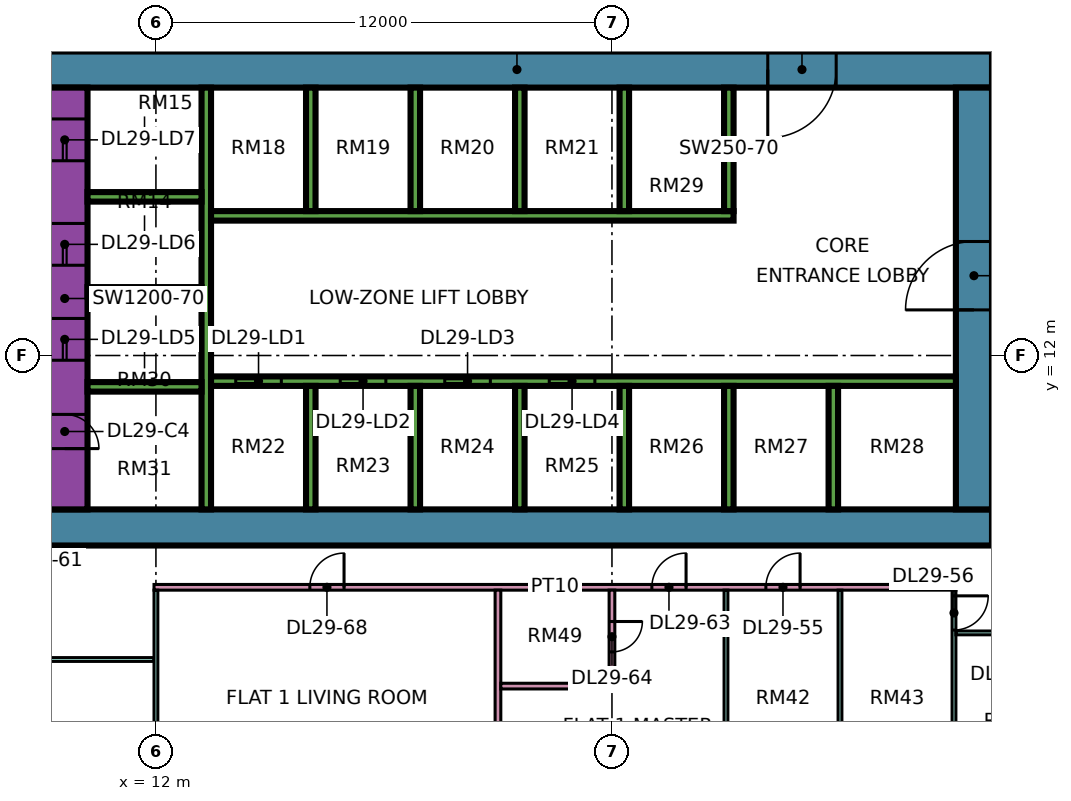
"""IFC4 building model, lengths in metres.
Left out: names, types, materials, properties, quantities, classifications, styles, units other than length and angle.
Written with IfcOpenShell. Run it as: python <this file> out.ifc"""

import sys

from ifc_helpers import new_model, si_unit, direction, frame, frame_2d, origin, place, context, subcontext, project, spatial, rectangle, extrude, element, fill, save


model = new_model("IFC4")
c1 = context("Model", 3, precision=1e-05, world=origin(), true_north=direction((0.0, 1.0)))
c2 = subcontext(c1, "Body", "Model", "MODEL_VIEW")
j1 = project(units=[si_unit("LENGTHUNIT", "METRE"), si_unit("PLANEANGLEUNIT", "RADIAN")], contexts=[c1])
p1 = place(None, origin())
s1 = spatial("IfcSite", under=j1, at=p1, CompositionType="ELEMENT")
p2 = place(p1, origin())
s2 = spatial("IfcBuilding", under=s1, at=p2, CompositionType="ELEMENT")
p3 = place(p2, frame((0.0, 0.0, 125.65)))
s3 = spatial("IfcBuildingStorey", under=s2, at=p3, CompositionType="ELEMENT", Elevation=125.65)
p4 = place(p3, frame((9.0, 7.475, 0.0), z_axis=(0.0, 0.0, 1.0), x_axis=(1.0, 0.0, 0.0)))
e1 = element("IfcWall", 1, at=p4, inside=s3, PredefinedType="SHEAR", context=c2, shape_type="SweptSolid", body=[
    extrude(rectangle(XDim=25.0, YDim=0.95, at=frame_2d((12.5, 0.0))), origin(), (0.0, 0.0, 1.0), 3.75),
])
p5 = place(p3, frame((9.0, 19.525, 0.0), z_axis=(0.0, 0.0, 1.0), x_axis=(1.0, 0.0, 0.0)))
e2 = element("IfcWall", 2, at=p5, inside=s3, PredefinedType="SHEAR", context=c2, shape_type="SweptSolid", body=[
    extrude(rectangle(XDim=25.0, YDim=0.95, at=frame_2d((12.5, 0.0))), origin(), (0.0, 0.0, 1.0), 3.75),
])
p6 = place(p5, frame((19.1, 0.0, 0.0)))
e3 = element("IfcOpeningElement", 3, at=p6, cuts=e2, PredefinedType="OPENING", context=c2, shape_type="SweptSolid", body=[
    extrude(rectangle(XDim=1.8, YDim=2.4, at=frame_2d((0.9, 1.2))), frame((0.0, 0.485, 0.0), z_axis=(0.0, -1.0, 0.0), x_axis=(1.0, 0.0, 0.0)), (0.0, 0.0, 1.0), 0.97),
])
p7 = place(p3, frame((9.6, 7.95, 0.0), z_axis=(0.0, 0.0, 1.0), x_axis=(0.0, 1.0, 0.0)))
e4 = element("IfcWall", 4, at=p7, inside=s3, PredefinedType="SHEAR", context=c2, shape_type="SweptSolid", body=[
    extrude(rectangle(XDim=11.1, YDim=1.2, at=frame_2d((5.55, 0.0))), origin(), (0.0, 0.0, 1.0), 3.75),
])
p8 = place(p7, frame((3.925, 0.0, 0.0)))
e5 = element("IfcOpeningElement", 5, at=p8, cuts=e4, PredefinedType="OPENING", context=c2, shape_type="SweptSolid", body=[
    extrude(rectangle(XDim=1.1, YDim=2.2, at=frame_2d((0.55, 1.1))), frame((0.0, 0.61, 0.0), z_axis=(0.0, -1.0, 0.0), x_axis=(1.0, 0.0, 0.0)), (0.0, 0.0, 1.0), 1.22),
])
p9 = place(p7, frame((6.425, 0.0, 0.0)))
e6 = element("IfcOpeningElement", 6, at=p9, cuts=e4, PredefinedType="OPENING", context=c2, shape_type="SweptSolid", body=[
    extrude(rectangle(XDim=1.1, YDim=2.2, at=frame_2d((0.55, 1.1))), frame((0.0, 0.61, 0.0), z_axis=(0.0, -1.0, 0.0), x_axis=(1.0, 0.0, 0.0)), (0.0, 0.0, 1.0), 1.22),
])
p10 = place(p7, frame((9.175, 0.0, 0.0)))
e7 = element("IfcOpeningElement", 7, at=p10, cuts=e4, PredefinedType="OPENING", context=c2, shape_type="SweptSolid", body=[
    extrude(rectangle(XDim=1.1, YDim=2.2, at=frame_2d((0.55, 1.1))), frame((0.0, 0.61, 0.0), z_axis=(0.0, -1.0, 0.0), x_axis=(1.0, 0.0, 0.0)), (0.0, 0.0, 1.0), 1.22),
])
p11 = place(p7, frame((1.6, 0.0, 0.0)))
e8 = element("IfcOpeningElement", 8, at=p11, cuts=e4, PredefinedType="OPENING", context=c2, shape_type="SweptSolid", body=[
    extrude(rectangle(XDim=0.9, YDim=2.1, at=frame_2d((0.45, 1.05))), frame((0.0, 0.61, 0.0), z_axis=(0.0, -1.0, 0.0), x_axis=(1.0, 0.0, 0.0)), (0.0, 0.0, 1.0), 1.22),
])
p12 = place(p3, frame((33.525, 7.95, 0.0), z_axis=(0.0, 0.0, 1.0), x_axis=(0.0, 1.0, 0.0)))
e9 = element("IfcWall", 9, at=p12, inside=s3, PredefinedType="SHEAR", context=c2, shape_type="SweptSolid", body=[
    extrude(rectangle(XDim=11.1, YDim=0.95, at=frame_2d((5.55, 0.0))), origin(), (0.0, 0.0, 1.0), 3.75),
])
p13 = place(p12, frame((5.25, 0.0, 0.0)))
e10 = element("IfcOpeningElement", 10, at=p13, cuts=e9, PredefinedType="OPENING", context=c2, shape_type="SweptSolid", body=[
    extrude(rectangle(XDim=1.8, YDim=2.4, at=frame_2d((0.9, 1.2))), frame((0.0, 0.485, 0.0), z_axis=(0.0, -1.0, 0.0), x_axis=(1.0, 0.0, 0.0)), (0.0, 0.0, 1.0), 0.97),
])
p14 = place(p3, frame((13.325, 7.95, 0.0), z_axis=(0.0, 0.0, 1.0), x_axis=(0.0, 1.0, 0.0)))
e11 = element("IfcWall", 11, at=p14, inside=s3, PredefinedType="SHEAR", context=c2, shape_type="SweptSolid", body=[
    extrude(rectangle(XDim=11.1, YDim=0.25, at=frame_2d((5.55, 0.0))), origin(), (0.0, 0.0, 1.0), 3.75),
])
p15 = place(p3, frame((13.45, 11.325, 0.0), z_axis=(0.0, 0.0, 1.0), x_axis=(1.0, 0.0, 0.0)))
e12 = element("IfcWall", 12, at=p15, inside=s3, PredefinedType="SHEAR", context=c2, shape_type="SweptSolid", body=[
    extrude(rectangle(XDim=19.6, YDim=0.25, at=frame_2d((9.8, 0.0))), origin(), (0.0, 0.0, 1.0), 3.75),
])
p16 = place(p15, frame((0.65, 0.0, 0.0)))
e13 = element("IfcOpeningElement", 13, at=p16, cuts=e12, PredefinedType="OPENING", context=c2, shape_type="SweptSolid", body=[
    extrude(rectangle(XDim=1.2, YDim=2.2, at=frame_2d((0.6, 1.1))), frame((0.0, 0.135, 0.0), z_axis=(0.0, -1.0, 0.0), x_axis=(1.0, 0.0, 0.0)), (0.0, 0.0, 1.0), 0.27),
])
p17 = place(p15, frame((3.4, 0.0, 0.0)))
e14 = element("IfcOpeningElement", 14, at=p17, cuts=e12, PredefinedType="OPENING", context=c2, shape_type="SweptSolid", body=[
    extrude(rectangle(XDim=1.2, YDim=2.2, at=frame_2d((0.6, 1.1))), frame((0.0, 0.135, 0.0), z_axis=(0.0, -1.0, 0.0), x_axis=(1.0, 0.0, 0.0)), (0.0, 0.0, 1.0), 0.27),
])
p18 = place(p15, frame((6.15, 0.0, 0.0)))
e15 = element("IfcOpeningElement", 15, at=p18, cuts=e12, PredefinedType="OPENING", context=c2, shape_type="SweptSolid", body=[
    extrude(rectangle(XDim=1.2, YDim=2.2, at=frame_2d((0.6, 1.1))), frame((0.0, 0.135, 0.0), z_axis=(0.0, -1.0, 0.0), x_axis=(1.0, 0.0, 0.0)), (0.0, 0.0, 1.0), 0.27),
])
p19 = place(p15, frame((8.9, 0.0, 0.0)))
e16 = element("IfcOpeningElement", 16, at=p19, cuts=e12, PredefinedType="OPENING", context=c2, shape_type="SweptSolid", body=[
    extrude(rectangle(XDim=1.2, YDim=2.2, at=frame_2d((0.6, 1.1))), frame((0.0, 0.135, 0.0), z_axis=(0.0, -1.0, 0.0), x_axis=(1.0, 0.0, 0.0)), (0.0, 0.0, 1.0), 0.27),
])
p20 = place(p3, frame((13.45, 15.675, 0.0), z_axis=(0.0, 0.0, 1.0), x_axis=(1.0, 0.0, 0.0)))
e17 = element("IfcWall", 17, at=p20, inside=s3, PredefinedType="SHEAR", context=c2, shape_type="SweptSolid", body=[
    extrude(rectangle(XDim=13.75, YDim=0.25, at=frame_2d((6.875, 0.0))), origin(), (0.0, 0.0, 1.0), 3.75),
])
for number, where, z_axis, x_axis in (
    (18, (10.2, 11.175, 0.0), (0.0, 0.0, 1.0), (1.0, 0.0, 0.0)),
    (19, (10.2, 13.675, 0.0), (0.0, 0.0, 1.0), (1.0, 0.0, 0.0)),
    (20, (10.2, 16.175, 0.0), (0.0, 0.0, 1.0), (1.0, 0.0, 0.0)),
):
    element("IfcWall", number, at=place(p3, frame(where, z_axis=z_axis, x_axis=x_axis)), inside=s3, PredefinedType="SHEAR", context=c2, shape_type="SweptSolid", body=[
        extrude(rectangle(XDim=3.0, YDim=0.25, at=frame_2d((1.5, 0.0))), origin(), (0.0, 0.0, 1.0), 3.75),
    ])
for number, where, z_axis, x_axis in (
    (21, (16.075, 7.95, 0.0), (0.0, 0.0, 1.0), (0.0, 1.0, 0.0)),
    (22, (18.825, 7.95, 0.0), (0.0, 0.0, 1.0), (0.0, 1.0, 0.0)),
    (23, (21.575, 7.95, 0.0), (0.0, 0.0, 1.0), (0.0, 1.0, 0.0)),
    (24, (24.325, 7.95, 0.0), (0.0, 0.0, 1.0), (0.0, 1.0, 0.0)),
    (25, (27.075, 7.95, 0.0), (0.0, 0.0, 1.0), (0.0, 1.0, 0.0)),
    (26, (29.825, 7.95, 0.0), (0.0, 0.0, 1.0), (0.0, 1.0, 0.0)),
    (27, (16.075, 15.8, 0.0), (0.0, 0.0, 1.0), (0.0, 1.0, 0.0)),
    (28, (18.825, 15.8, 0.0), (0.0, 0.0, 1.0), (0.0, 1.0, 0.0)),
    (29, (21.575, 15.8, 0.0), (0.0, 0.0, 1.0), (0.0, 1.0, 0.0)),
    (30, (24.325, 15.8, 0.0), (0.0, 0.0, 1.0), (0.0, 1.0, 0.0)),
    (31, (27.075, 15.8, 0.0), (0.0, 0.0, 1.0), (0.0, 1.0, 0.0)),
):
    element("IfcWall", number, at=place(p3, frame(where, z_axis=z_axis, x_axis=x_axis)), inside=s3, PredefinedType="SHEAR", context=c2, shape_type="SweptSolid", body=[
        extrude(rectangle(XDim=3.25, YDim=0.25, at=frame_2d((1.625, 0.0))), origin(), (0.0, 0.0, 1.0), 3.75),
    ])
p21 = place(p3, frame((-1.447, 12.553, 0.0), z_axis=(0.0, 0.0, 1.0), x_axis=(0.707106781187, -0.707106781187, 0.0)))
e32 = element("IfcWall", 32, at=p21, inside=s3, PredefinedType="SOLIDWALL", context=c2, shape_type="SweptSolid", body=[
    extrude(rectangle(XDim=19.799, YDim=0.15, at=frame_2d((9.899, 0.0))), origin(), (0.0, 0.0, 1.0), 3.35),
])
p22 = place(p21, frame((2.212, 0.0, 0.45)))
e33 = element("IfcOpeningElement", 33, at=p22, cuts=e32, PredefinedType="OPENING", context=c2, shape_type="SweptSolid", body=[
    extrude(rectangle(XDim=3.0, YDim=2.4, at=frame_2d((1.5, 1.2))), frame((0.0, 0.085, 0.0), z_axis=(0.0, -1.0, 0.0), x_axis=(1.0, 0.0, 0.0)), (0.0, 0.0, 1.0), 0.17),
])
p23 = place(p21, frame((10.216, 0.0, 0.45)))
e34 = element("IfcOpeningElement", 34, at=p23, cuts=e32, PredefinedType="OPENING", context=c2, shape_type="SweptSolid", body=[
    extrude(rectangle(XDim=3.0, YDim=2.4, at=frame_2d((1.5, 1.2))), frame((0.0, 0.085, 0.0), z_axis=(0.0, -1.0, 0.0), x_axis=(1.0, 0.0, 0.0)), (0.0, 0.0, 1.0), 0.17),
])
p24 = place(p3, frame((9.05, 4.0, 0.0), z_axis=(0.0, 0.0, 1.0), x_axis=(1.0, 0.0, 0.0)))
e35 = element("IfcWall", 35, at=p24, inside=s3, PredefinedType="PARTITIONING", context=c2, shape_type="SweptSolid", body=[
    extrude(rectangle(XDim=2.9, YDim=0.1, at=frame_2d((1.45, 0.0))), origin(), (0.0, 0.0, 1.0), 3.35),
])
p25 = place(p3, frame((11.95, 5.9, 0.0), z_axis=(0.0, 0.0, 1.0), x_axis=(1.0, 0.0, 0.0)))
e36 = element("IfcWall", 36, at=p25, inside=s3, PredefinedType="PARTITIONING", context=c2, shape_type="SweptSolid", body=[
    extrude(rectangle(XDim=21.1, YDim=0.15, at=frame_2d((10.55, 0.0))), origin(), (0.0, 0.0, 1.0), 3.35),
])
p26 = place(p25, frame((16.1, 0.0, 0.0)))
e37 = element("IfcOpeningElement", 37, at=p26, cuts=e36, PredefinedType="OPENING", context=c2, shape_type="SweptSolid", body=[
    extrude(rectangle(XDim=0.9, YDim=2.1, at=frame_2d((0.45, 1.05))), frame((0.0, 0.085, 0.0), z_axis=(0.0, -1.0, 0.0), x_axis=(1.0, 0.0, 0.0)), (0.0, 0.0, 1.0), 0.17),
])
p27 = place(p25, frame((13.1, 0.0, 0.0)))
e38 = element("IfcOpeningElement", 38, at=p27, cuts=e36, PredefinedType="OPENING", context=c2, shape_type="SweptSolid", body=[
    extrude(rectangle(XDim=0.9, YDim=2.1, at=frame_2d((0.45, 1.05))), frame((0.0, 0.085, 0.0), z_axis=(0.0, -1.0, 0.0), x_axis=(1.0, 0.0, 0.0)), (0.0, 0.0, 1.0), 0.17),
])
p28 = place(p25, frame((4.1, 0.0, 0.0)))
e39 = element("IfcOpeningElement", 39, at=p28, cuts=e36, PredefinedType="OPENING", context=c2, shape_type="SweptSolid", body=[
    extrude(rectangle(XDim=0.9, YDim=2.1, at=frame_2d((0.45, 1.05))), frame((0.0, 0.085, 0.0), z_axis=(0.0, -1.0, 0.0), x_axis=(1.0, 0.0, 0.0)), (0.0, 0.0, 1.0), 0.17),
])
p29 = place(p3, frame((12.0, -0.788, 0.0), z_axis=(0.0, 0.0, 1.0), x_axis=(0.0, 1.0, 0.0)))
e40 = element("IfcWall", 40, at=p29, inside=s3, PredefinedType="PARTITIONING", context=c2, shape_type="SweptSolid", body=[
    extrude(rectangle(XDim=6.613, YDim=0.1, at=frame_2d((3.306, 0.0))), origin(), (0.0, 0.0, 1.0), 3.35),
])
p30 = place(p3, frame((21.0, -1.35, 0.0), z_axis=(0.0, 0.0, 1.0), x_axis=(0.0, 1.0, 0.0)))
e41 = element("IfcWall", 41, at=p30, inside=s3, PredefinedType="PARTITIONING", context=c2, shape_type="SweptSolid", body=[
    extrude(rectangle(XDim=7.175, YDim=0.15, at=frame_2d((3.587, 0.0))), origin(), (0.0, 0.0, 1.0), 3.35),
])
p31 = place(p3, frame((21.075, 3.3, 0.0), z_axis=(0.0, 0.0, 1.0), x_axis=(1.0, 0.0, 0.0)))
e42 = element("IfcWall", 42, at=p31, inside=s3, PredefinedType="PARTITIONING", context=c2, shape_type="SweptSolid", body=[
    extrude(rectangle(XDim=3.0, YDim=0.15, at=frame_2d((1.5, 0.0))), origin(), (0.0, 0.0, 1.0), 3.35),
])
p32 = place(p3, frame((24.0, 3.375, 0.0), z_axis=(0.0, 0.0, 1.0), x_axis=(0.0, 1.0, 0.0)))
e43 = element("IfcWall", 43, at=p32, inside=s3, PredefinedType="PARTITIONING", context=c2, shape_type="SweptSolid", body=[
    extrude(rectangle(XDim=2.45, YDim=0.15, at=frame_2d((1.225, 0.0))), origin(), (0.0, 0.0, 1.0), 3.35),
])
p33 = place(p32, frame((0.825, 0.0, 0.0)))
e44 = element("IfcOpeningElement", 44, at=p33, cuts=e43, PredefinedType="OPENING", context=c2, shape_type="SweptSolid", body=[
    extrude(rectangle(XDim=0.8, YDim=2.1, at=frame_2d((0.4, 1.05))), frame((0.0, 0.085, 0.0), z_axis=(0.0, -1.0, 0.0), x_axis=(1.0, 0.0, 0.0)), (0.0, 0.0, 1.0), 0.17),
])
for number, where, z_axis, x_axis in (
    (45, (27.0, 0.074, 0.0), (0.0, 0.0, 1.0), (0.0, 1.0, 0.0)),
    (46, (30.0, 0.074, 0.0), (0.0, 0.0, 1.0), (0.0, 1.0, 0.0)),
):
    element("IfcWall", number, at=place(p3, frame(where, z_axis=z_axis, x_axis=x_axis)), inside=s3, PredefinedType="PARTITIONING", context=c2, shape_type="SweptSolid", body=[
        extrude(rectangle(XDim=5.751, YDim=0.1, at=frame_2d((2.875, 0.0))), origin(), (0.0, 0.0, 1.0), 3.35),
    ])
p34 = place(p3, frame((33.0, 0.074, 0.0), z_axis=(0.0, 0.0, 1.0), x_axis=(0.0, 1.0, 0.0)))
e47 = element("IfcWall", 47, at=p34, inside=s3, PredefinedType="PARTITIONING", context=c2, shape_type="SweptSolid", body=[
    extrude(rectangle(XDim=5.751, YDim=0.1, at=frame_2d((2.875, 0.0))), origin(), (0.0, 0.0, 1.0), 3.35),
])
p35 = place(p34, frame((4.701, 0.0, 0.0)))
e48 = element("IfcOpeningElement", 48, at=p35, cuts=e47, PredefinedType="OPENING", context=c2, shape_type="SweptSolid", body=[
    extrude(rectangle(XDim=0.9, YDim=2.1, at=frame_2d((0.45, 1.05))), frame((0.0, 0.06, 0.0), z_axis=(0.0, -1.0, 0.0), x_axis=(1.0, 0.0, 0.0)), (0.0, 0.0, 1.0), 0.12),
])
p36 = place(p3, frame((33.05, 4.7, 0.0), z_axis=(0.0, 0.0, 1.0), x_axis=(1.0, 0.0, 0.0)))
e49 = element("IfcWall", 49, at=p36, inside=s3, PredefinedType="PARTITIONING", context=c2, shape_type="SweptSolid", body=[
    extrude(rectangle(XDim=20.85, YDim=0.1, at=frame_2d((10.425, 0.0))), origin(), (0.0, 0.0, 1.0), 3.35),
])
p37 = place(p36, frame((1.0, 0.0, 0.0)))
e50 = element("IfcOpeningElement", 50, at=p37, cuts=e49, PredefinedType="OPENING", context=c2, shape_type="SweptSolid", body=[
    extrude(rectangle(XDim=0.9, YDim=2.1, at=frame_2d((0.45, 1.05))), frame((0.0, 0.06, 0.0), z_axis=(0.0, -1.0, 0.0), x_axis=(1.0, 0.0, 0.0)), (0.0, 0.0, 1.0), 0.12),
])
p38 = place(p36, frame((4.0, 0.0, 0.0)))
e51 = element("IfcOpeningElement", 51, at=p38, cuts=e49, PredefinedType="OPENING", context=c2, shape_type="SweptSolid", body=[
    extrude(rectangle(XDim=0.9, YDim=2.1, at=frame_2d((0.45, 1.05))), frame((0.0, 0.06, 0.0), z_axis=(0.0, -1.0, 0.0), x_axis=(1.0, 0.0, 0.0)), (0.0, 0.0, 1.0), 0.12),
])
p39 = place(p36, frame((16.0, 0.0, 0.0)))
e52 = element("IfcOpeningElement", 52, at=p39, cuts=e49, PredefinedType="OPENING", context=c2, shape_type="SweptSolid", body=[
    extrude(rectangle(XDim=0.9, YDim=2.1, at=frame_2d((0.45, 1.05))), frame((0.0, 0.06, 0.0), z_axis=(0.0, -1.0, 0.0), x_axis=(1.0, 0.0, 0.0)), (0.0, 0.0, 1.0), 0.12),
])
p40 = place(p36, frame((19.0, 0.0, 0.0)))
e53 = element("IfcOpeningElement", 53, at=p40, cuts=e49, PredefinedType="OPENING", context=c2, shape_type="SweptSolid", body=[
    extrude(rectangle(XDim=0.9, YDim=2.1, at=frame_2d((0.45, 1.05))), frame((0.0, 0.06, 0.0), z_axis=(0.0, -1.0, 0.0), x_axis=(1.0, 0.0, 0.0)), (0.0, 0.0, 1.0), 0.12),
])
p41 = place(p36, frame((10.0, 0.0, 0.0)))
e54 = element("IfcOpeningElement", 54, at=p41, cuts=e49, PredefinedType="OPENING", context=c2, shape_type="SweptSolid", body=[
    extrude(rectangle(XDim=0.9, YDim=2.1, at=frame_2d((0.45, 1.05))), frame((0.0, 0.06, 0.0), z_axis=(0.0, -1.0, 0.0), x_axis=(1.0, 0.0, 0.0)), (0.0, 0.0, 1.0), 0.12),
])
p42 = place(p16, origin())
e55 = element("IfcDoor", 55, at=p42, inside=s3, OperationType="DOUBLE_DOOR_SLIDING", PredefinedType="DOOR", context=c2, shape_type="SweptSolid", body=[
    extrude(rectangle(XDim=1.2, YDim=2.2, at=frame_2d((0.6, 1.1))), frame((0.0, 0.025, 0.0), z_axis=(0.0, -1.0, 0.0), x_axis=(1.0, 0.0, 0.0)), (0.0, 0.0, 1.0), 0.05),
])
fill(e13, e55)
p43 = place(p17, origin())
e56 = element("IfcDoor", 56, at=p43, inside=s3, OperationType="DOUBLE_DOOR_SLIDING", PredefinedType="DOOR", context=c2, shape_type="SweptSolid", body=[
    extrude(rectangle(XDim=1.2, YDim=2.2, at=frame_2d((0.6, 1.1))), frame((0.0, 0.025, 0.0), z_axis=(0.0, -1.0, 0.0), x_axis=(1.0, 0.0, 0.0)), (0.0, 0.0, 1.0), 0.05),
])
fill(e14, e56)
p44 = place(p18, origin())
e57 = element("IfcDoor", 57, at=p44, inside=s3, OperationType="DOUBLE_DOOR_SLIDING", PredefinedType="DOOR", context=c2, shape_type="SweptSolid", body=[
    extrude(rectangle(XDim=1.2, YDim=2.2, at=frame_2d((0.6, 1.1))), frame((0.0, 0.025, 0.0), z_axis=(0.0, -1.0, 0.0), x_axis=(1.0, 0.0, 0.0)), (0.0, 0.0, 1.0), 0.05),
])
fill(e15, e57)
p45 = place(p19, origin())
e58 = element("IfcDoor", 58, at=p45, inside=s3, OperationType="DOUBLE_DOOR_SLIDING", PredefinedType="DOOR", context=c2, shape_type="SweptSolid", body=[
    extrude(rectangle(XDim=1.2, YDim=2.2, at=frame_2d((0.6, 1.1))), frame((0.0, 0.025, 0.0), z_axis=(0.0, -1.0, 0.0), x_axis=(1.0, 0.0, 0.0)), (0.0, 0.0, 1.0), 0.05),
])
fill(e16, e58)
p46 = place(p8, origin())
e59 = element("IfcDoor", 59, at=p46, inside=s3, OperationType="DOUBLE_DOOR_SLIDING", PredefinedType="DOOR", context=c2, shape_type="SweptSolid", body=[
    extrude(rectangle(XDim=1.1, YDim=2.2, at=frame_2d((0.55, 1.1))), frame((0.0, 0.025, 0.0), z_axis=(0.0, -1.0, 0.0), x_axis=(1.0, 0.0, 0.0)), (0.0, 0.0, 1.0), 0.05),
])
fill(e5, e59)
p47 = place(p9, origin())
e60 = element("IfcDoor", 60, at=p47, inside=s3, OperationType="DOUBLE_DOOR_SLIDING", PredefinedType="DOOR", context=c2, shape_type="SweptSolid", body=[
    extrude(rectangle(XDim=1.1, YDim=2.2, at=frame_2d((0.55, 1.1))), frame((0.0, 0.025, 0.0), z_axis=(0.0, -1.0, 0.0), x_axis=(1.0, 0.0, 0.0)), (0.0, 0.0, 1.0), 0.05),
])
fill(e6, e60)
p48 = place(p10, origin())
e61 = element("IfcDoor", 61, at=p48, inside=s3, OperationType="DOUBLE_DOOR_SLIDING", PredefinedType="DOOR", context=c2, shape_type="SweptSolid", body=[
    extrude(rectangle(XDim=1.1, YDim=2.2, at=frame_2d((0.55, 1.1))), frame((0.0, 0.025, 0.0), z_axis=(0.0, -1.0, 0.0), x_axis=(1.0, 0.0, 0.0)), (0.0, 0.0, 1.0), 0.05),
])
fill(e7, e61)
p49 = place(p13, origin())
e62 = element("IfcDoor", 62, at=p49, inside=s3, OperationType="DOUBLE_DOOR_SINGLE_SWING", PredefinedType="DOOR", context=c2, shape_type="SweptSolid", body=[
    extrude(rectangle(XDim=1.8, YDim=2.4, at=frame_2d((0.9, 1.2))), frame((0.0, 0.025, 0.0), z_axis=(0.0, -1.0, 0.0), x_axis=(1.0, 0.0, 0.0)), (0.0, 0.0, 1.0), 0.05),
])
fill(e10, e62)
p50 = place(p6, frame((1.8, 0.0, 0.0), z_axis=(0.0, 0.0, 1.0), x_axis=(-1.0, 0.0, 0.0)))
e63 = element("IfcDoor", 63, at=p50, inside=s3, OperationType="DOUBLE_DOOR_SINGLE_SWING", PredefinedType="DOOR", context=c2, shape_type="SweptSolid", body=[
    extrude(rectangle(XDim=1.8, YDim=2.4, at=frame_2d((0.9, 1.2))), frame((0.0, 0.025, 0.0), z_axis=(0.0, -1.0, 0.0), x_axis=(1.0, 0.0, 0.0)), (0.0, 0.0, 1.0), 0.05),
])
fill(e3, e63)
p51 = place(p11, frame((0.9, 0.0, 0.0), z_axis=(0.0, 0.0, 1.0), x_axis=(-1.0, 0.0, 0.0)))
e64 = element("IfcDoor", 64, at=p51, inside=s3, OperationType="SINGLE_SWING_LEFT", PredefinedType="DOOR", context=c2, shape_type="SweptSolid", body=[
    extrude(rectangle(XDim=0.9, YDim=2.1, at=frame_2d((0.45, 1.05))), frame((0.0, 0.025, 0.0), z_axis=(0.0, -1.0, 0.0), x_axis=(1.0, 0.0, 0.0)), (0.0, 0.0, 1.0), 0.05),
])
fill(e8, e64)
p52 = place(p26, frame((0.9, 0.0, 0.0), z_axis=(0.0, 0.0, 1.0), x_axis=(-1.0, 0.0, 0.0)))
e65 = element("IfcDoor", 65, at=p52, inside=s3, OperationType="SINGLE_SWING_RIGHT", PredefinedType="DOOR", context=c2, shape_type="SweptSolid", body=[
    extrude(rectangle(XDim=0.9, YDim=2.1, at=frame_2d((0.45, 1.05))), frame((0.0, 0.025, 0.0), z_axis=(0.0, -1.0, 0.0), x_axis=(1.0, 0.0, 0.0)), (0.0, 0.0, 1.0), 0.05),
])
fill(e37, e65)
p53 = place(p35, origin())
e66 = element("IfcDoor", 66, at=p53, inside=s3, OperationType="SINGLE_SWING_RIGHT", PredefinedType="DOOR", context=c2, shape_type="SweptSolid", body=[
    extrude(rectangle(XDim=0.9, YDim=2.1, at=frame_2d((0.45, 1.05))), frame((0.0, 0.025, 0.0), z_axis=(0.0, -1.0, 0.0), x_axis=(1.0, 0.0, 0.0)), (0.0, 0.0, 1.0), 0.05),
])
fill(e48, e66)
p54 = place(p27, frame((0.9, 0.0, 0.0), z_axis=(0.0, 0.0, 1.0), x_axis=(-1.0, 0.0, 0.0)))
e67 = element("IfcDoor", 67, at=p54, inside=s3, OperationType="SINGLE_SWING_RIGHT", PredefinedType="DOOR", context=c2, shape_type="SweptSolid", body=[
    extrude(rectangle(XDim=0.9, YDim=2.1, at=frame_2d((0.45, 1.05))), frame((0.0, 0.025, 0.0), z_axis=(0.0, -1.0, 0.0), x_axis=(1.0, 0.0, 0.0)), (0.0, 0.0, 1.0), 0.05),
])
fill(e38, e67)
p55 = place(p33, origin())
e68 = element("IfcDoor", 68, at=p55, inside=s3, OperationType="SINGLE_SWING_RIGHT", PredefinedType="DOOR", context=c2, shape_type="SweptSolid", body=[
    extrude(rectangle(XDim=0.8, YDim=2.1, at=frame_2d((0.4, 1.05))), frame((0.0, 0.025, 0.0), z_axis=(0.0, -1.0, 0.0), x_axis=(1.0, 0.0, 0.0)), (0.0, 0.0, 1.0), 0.05),
])
fill(e44, e68)
p56 = place(p28, frame((0.9, 0.0, 0.0), z_axis=(0.0, 0.0, 1.0), x_axis=(-1.0, 0.0, 0.0)))
e69 = element("IfcDoor", 69, at=p56, inside=s3, OperationType="SINGLE_SWING_RIGHT", PredefinedType="DOOR", context=c2, shape_type="SweptSolid", body=[
    extrude(rectangle(XDim=0.9, YDim=2.1, at=frame_2d((0.45, 1.05))), frame((0.0, 0.025, 0.0), z_axis=(0.0, -1.0, 0.0), x_axis=(1.0, 0.0, 0.0)), (0.0, 0.0, 1.0), 0.05),
])
fill(e39, e69)
save(model, sys.argv[1])
